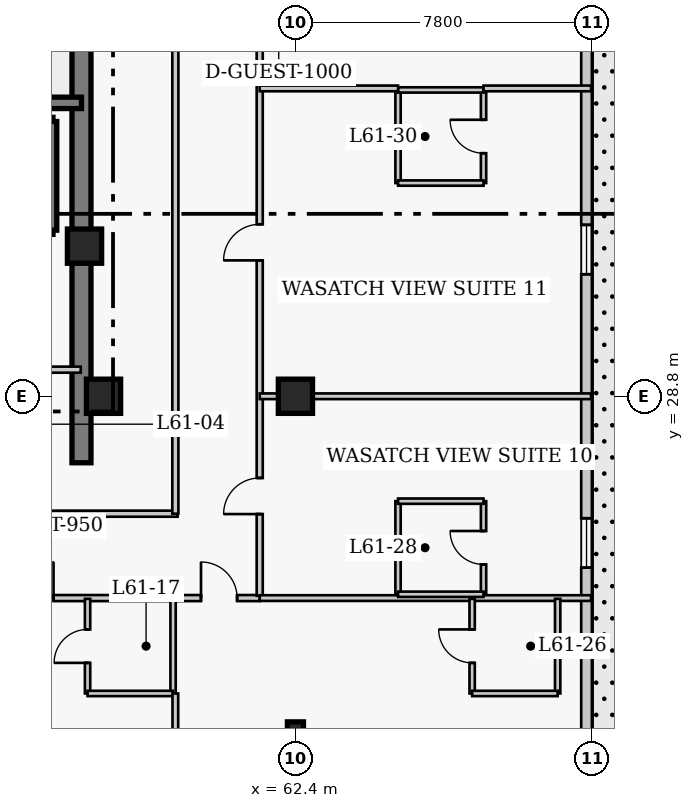
"""IFC4 building model, lengths in metres.
Left out: names, types, materials, properties, quantities, classifications, styles, units other than length and angle.
Written with IfcOpenShell. Run it as: python <this file> out.ifc"""

import sys

from ifc_helpers import new_model, si_unit, direction, frame, frame_2d, origin, origin_2d, place, context, subcontext, project, spatial, rectangle, i_section, extrude, element, fill, save


model = new_model("IFC4")
c1 = context("Model", 3, precision=1e-05, world=origin(), true_north=direction((0.0, 1.0)))
c2 = subcontext(c1, "Body", "Model", "MODEL_VIEW")
j1 = project(units=[si_unit("LENGTHUNIT", "METRE"), si_unit("PLANEANGLEUNIT", "RADIAN")], contexts=[c1])
p1 = place(None, origin())
s1 = spatial("IfcSite", under=j1, at=p1, CompositionType="ELEMENT")
p2 = place(p1, origin())
s2 = spatial("IfcBuilding", under=s1, at=p2, CompositionType="ELEMENT")
p3 = place(p2, frame((0.0, 0.0, 245.4)))
s3 = spatial("IfcBuildingStorey", under=s2, at=p3, CompositionType="ELEMENT", Elevation=245.4)
p4 = place(p3, frame((56.77, 27.05, 0.0), z_axis=(0.0, 0.0, 1.0), x_axis=(0.0, 1.0, 0.0)))
e1 = element("IfcWall", 1, at=p4, inside=s3, PredefinedType="SHEAR", context=c2, shape_type="SweptSolid", body=[
    extrude(rectangle(XDim=13.52, YDim=0.5, at=frame_2d((6.76, 0.0))), origin(), (0.0, 0.0, 1.0), 4.0),
])
p5 = place(p3, frame((48.45, 36.52, 0.0), z_axis=(0.0, 0.0, 1.0), x_axis=(1.0, 0.0, 0.0)))
e2 = element("IfcWall", 2, at=p5, inside=s3, PredefinedType="SHEAR", context=c2, shape_type="SweptSolid", body=[
    extrude(rectangle(XDim=8.32, YDim=0.3, at=frame_2d((4.16, 0.0))), origin(), (0.0, 0.0, 1.0), 4.0),
])
p6 = place(p3, frame((62.4, 20.0, 0.0), z_axis=(0.0, 0.0, 1.0), x_axis=(1.0, 0.0, 0.0)))
e3 = element("IfcColumn", 3, at=p6, inside=s3, PredefinedType="COLUMN", context=c2, shape_type="SweptSolid", body=[
    extrude(i_section(OverallWidth=0.422, OverallDepth=0.465, WebThickness=0.045, FlangeThickness=0.073, FilletRadius=0.017, at=origin_2d()), origin(), (0.0, 0.0, 1.0), 4.0),
])
for number, where, z_axis, x_axis in (
    (4, (62.4, 28.8, 0.0), (0.0, 0.0, 1.0), (1.0, 0.0, 0.0)),
    (5, (57.35, 28.8, 0.0), (0.0, 0.0, 1.0), (1.0, 0.0, 0.0)),
    (6, (56.85, 32.75, 0.0), (0.0, 0.0, 1.0), (1.0, 0.0, 0.0)),
):
    element("IfcColumn", number, at=place(p3, frame(where, z_axis=z_axis, x_axis=x_axis)), inside=s3, PredefinedType="COLUMN", context=c2, shape_type="SweptSolid", body=[
        extrude(rectangle(XDim=0.9, YDim=0.9, at=origin_2d()), origin(), (0.0, 0.0, 1.0), 4.0),
    ])
p7 = place(p3, frame((70.06, 13.36, 0.0), z_axis=(0.0, 0.0, 1.0), x_axis=(0.0, 1.0, 0.0)))
e7 = element("IfcWall", 7, at=p7, inside=s3, PredefinedType="SOLIDWALL", context=c2, shape_type="SweptSolid", body=[
    extrude(rectangle(XDim=30.88, YDim=0.28, at=frame_2d((15.44, 0.0))), origin(), (0.0, 0.0, 1.0), 3.76),
])
p8 = place(p7, frame((3.21, 0.0, 0.85)))
e8 = element("IfcOpeningElement", 8, at=p8, cuts=e7, PredefinedType="OPENING", context=c2, shape_type="SweptSolid", body=[
    extrude(rectangle(XDim=1.3, YDim=1.7, at=frame_2d((0.65, 0.85))), frame((0.0, 0.15, 0.0), z_axis=(0.0, -1.0, 0.0), x_axis=(1.0, 0.0, 0.0)), (0.0, 0.0, 1.0), 0.3),
])
p9 = place(p7, frame((10.93, 0.0, 0.85)))
e9 = element("IfcOpeningElement", 9, at=p9, cuts=e7, PredefinedType="OPENING", context=c2, shape_type="SweptSolid", body=[
    extrude(rectangle(XDim=1.3, YDim=1.7, at=frame_2d((0.65, 0.85))), frame((0.0, 0.15, 0.0), z_axis=(0.0, -1.0, 0.0), x_axis=(1.0, 0.0, 0.0)), (0.0, 0.0, 1.0), 0.3),
])
p10 = place(p7, frame((18.65, 0.0, 0.85)))
e10 = element("IfcOpeningElement", 10, at=p10, cuts=e7, PredefinedType="OPENING", context=c2, shape_type="SweptSolid", body=[
    extrude(rectangle(XDim=1.3, YDim=1.7, at=frame_2d((0.65, 0.85))), frame((0.0, 0.15, 0.0), z_axis=(0.0, -1.0, 0.0), x_axis=(1.0, 0.0, 0.0)), (0.0, 0.0, 1.0), 0.3),
])
p11 = place(p7, frame((26.37, 0.0, 0.85)))
e11 = element("IfcOpeningElement", 11, at=p11, cuts=e7, PredefinedType="OPENING", context=c2, shape_type="SweptSolid", body=[
    extrude(rectangle(XDim=1.3, YDim=1.7, at=frame_2d((0.65, 0.85))), frame((0.0, 0.15, 0.0), z_axis=(0.0, -1.0, 0.0), x_axis=(1.0, 0.0, 0.0)), (0.0, 0.0, 1.0), 0.3),
])
p12 = place(p3, frame((53.6, 36.03, 0.0), z_axis=(0.0, 0.0, 1.0), x_axis=(1.0, 0.0, 0.0)))
e12 = element("IfcWall", 12, at=p12, inside=s3, PredefinedType="SHEAR", context=c2, shape_type="SweptSolid", body=[
    extrude(rectangle(XDim=2.42, YDim=0.22, at=frame_2d((1.21, 0.0))), origin(), (0.0, 0.0, 1.0), 4.0),
])
p13 = place(p3, frame((53.6, 33.17, 0.0), z_axis=(0.0, 0.0, 1.0), x_axis=(1.0, 0.0, 0.0)))
e13 = element("IfcWall", 13, at=p13, inside=s3, PredefinedType="SHEAR", context=c2, shape_type="SweptSolid", body=[
    extrude(rectangle(XDim=2.42, YDim=0.22, at=frame_2d((1.21, 0.0))), origin(), (0.0, 0.0, 1.0), 4.0),
])
p14 = place(p13, frame((0.65, 0.0, 0.0)))
e14 = element("IfcOpeningElement", 14, at=p14, cuts=e13, PredefinedType="OPENING", context=c2, shape_type="SweptSolid", body=[
    extrude(rectangle(XDim=1.3, YDim=2.15, at=frame_2d((0.65, 1.075))), frame((0.0, 0.12, 0.0), z_axis=(0.0, -1.0, 0.0), x_axis=(1.0, 0.0, 0.0)), (0.0, 0.0, 1.0), 0.24),
])
p15 = place(p3, frame((56.02, 33.17, 0.0), z_axis=(0.0, 0.0, 1.0), x_axis=(0.0, 1.0, 0.0)))
e15 = element("IfcWall", 15, at=p15, inside=s3, PredefinedType="SHEAR", context=c2, shape_type="SweptSolid", body=[
    extrude(rectangle(XDim=2.86, YDim=0.2, at=frame_2d((1.43, 0.0))), origin(), (0.0, 0.0, 1.0), 4.0),
])
p16 = place(p3, frame((51.12, 29.5, 0.0), z_axis=(0.0, 0.0, 1.0), x_axis=(1.0, 0.0, 0.0)))
e16 = element("IfcWall", 16, at=p16, inside=s3, PredefinedType="PARTITIONING", context=c2, shape_type="SweptSolid", body=[
    extrude(rectangle(XDim=5.63, YDim=0.16, at=frame_2d((2.815, 0.0))), origin(), (0.0, 0.0, 1.0), 3.76),
])
p17 = place(p3, frame((35.85, 25.71, 0.0), z_axis=(0.0, 0.0, 1.0), x_axis=(1.0, 0.0, 0.0)))
e17 = element("IfcWall", 17, at=p17, inside=s3, PredefinedType="PARTITIONING", context=c2, shape_type="SweptSolid", body=[
    extrude(rectangle(XDim=23.45, YDim=0.16, at=frame_2d((11.725, 0.0))), origin(), (0.0, 0.0, 1.0), 3.76),
])
p18 = place(p17, frame((6.15, 0.0, 0.0)))
e18 = element("IfcOpeningElement", 18, at=p18, cuts=e17, PredefinedType="OPENING", context=c2, shape_type="SweptSolid", body=[
    extrude(rectangle(XDim=1.0, YDim=2.15, at=frame_2d((0.5, 1.075))), frame((0.0, 0.09, 0.0), z_axis=(0.0, -1.0, 0.0), x_axis=(1.0, 0.0, 0.0)), (0.0, 0.0, 1.0), 0.18),
])
p19 = place(p17, frame((13.65, 0.0, 0.0)))
e19 = element("IfcOpeningElement", 19, at=p19, cuts=e17, PredefinedType="OPENING", context=c2, shape_type="SweptSolid", body=[
    extrude(rectangle(XDim=1.0, YDim=2.15, at=frame_2d((0.5, 1.075))), frame((0.0, 0.09, 0.0), z_axis=(0.0, -1.0, 0.0), x_axis=(1.0, 0.0, 0.0)), (0.0, 0.0, 1.0), 0.18),
])
p20 = place(p3, frame((35.8, 23.49, 0.0), z_axis=(0.0, 0.0, 1.0), x_axis=(1.0, 0.0, 0.0)))
e20 = element("IfcWall", 20, at=p20, inside=s3, PredefinedType="PARTITIONING", context=c2, shape_type="SweptSolid", body=[
    extrude(rectangle(XDim=25.66, YDim=0.16, at=frame_2d((12.83, 0.0))), origin(), (0.0, 0.0, 1.0), 3.76),
])
p21 = place(p20, frame((1.555, 0.0, 0.0)))
e21 = element("IfcOpeningElement", 21, at=p21, cuts=e20, PredefinedType="OPENING", context=c2, shape_type="SweptSolid", body=[
    extrude(rectangle(XDim=0.95, YDim=2.1, at=frame_2d((0.475, 1.05))), frame((0.0, 0.09, 0.0), z_axis=(0.0, -1.0, 0.0), x_axis=(1.0, 0.0, 0.0)), (0.0, 0.0, 1.0), 0.18),
])
p22 = place(p20, frame((10.57, 0.0, 0.0)))
e22 = element("IfcOpeningElement", 22, at=p22, cuts=e20, PredefinedType="OPENING", context=c2, shape_type="SweptSolid", body=[
    extrude(rectangle(XDim=0.95, YDim=2.1, at=frame_2d((0.475, 1.05))), frame((0.0, 0.09, 0.0), z_axis=(0.0, -1.0, 0.0), x_axis=(1.0, 0.0, 0.0)), (0.0, 0.0, 1.0), 0.18),
])
p23 = place(p20, frame((15.105, 0.0, 0.0)))
e23 = element("IfcOpeningElement", 23, at=p23, cuts=e20, PredefinedType="OPENING", context=c2, shape_type="SweptSolid", body=[
    extrude(rectangle(XDim=1.0, YDim=2.15, at=frame_2d((0.5, 1.075))), frame((0.0, 0.09, 0.0), z_axis=(0.0, -1.0, 0.0), x_axis=(1.0, 0.0, 0.0)), (0.0, 0.0, 1.0), 0.18),
])
p24 = place(p20, frame((19.285, 0.0, 0.0)))
e24 = element("IfcOpeningElement", 24, at=p24, cuts=e20, PredefinedType="OPENING", context=c2, shape_type="SweptSolid", body=[
    extrude(rectangle(XDim=0.95, YDim=2.1, at=frame_2d((0.475, 1.05))), frame((0.0, 0.09, 0.0), z_axis=(0.0, -1.0, 0.0), x_axis=(1.0, 0.0, 0.0)), (0.0, 0.0, 1.0), 0.18),
])
p25 = place(p20, frame((24.115, 0.0, 0.0)))
e25 = element("IfcOpeningElement", 25, at=p25, cuts=e20, PredefinedType="OPENING", context=c2, shape_type="SweptSolid", body=[
    extrude(rectangle(XDim=0.95, YDim=2.1, at=frame_2d((0.475, 1.05))), frame((0.0, 0.09, 0.0), z_axis=(0.0, -1.0, 0.0), x_axis=(1.0, 0.0, 0.0)), (0.0, 0.0, 1.0), 0.18),
])
p26 = place(p3, frame((61.46, 23.55, 0.0), z_axis=(0.0, 0.0, 1.0), x_axis=(0.0, 1.0, 0.0)))
e26 = element("IfcWall", 26, at=p26, inside=s3, PredefinedType="PARTITIONING", context=c2, shape_type="SweptSolid", body=[
    extrude(rectangle(XDim=17.1, YDim=0.16, at=frame_2d((8.55, 0.0))), origin(), (0.0, 0.0, 1.0), 3.76),
])
p27 = place(p26, frame((2.15, 0.0, 0.0)))
e27 = element("IfcOpeningElement", 27, at=p27, cuts=e26, PredefinedType="OPENING", context=c2, shape_type="SweptSolid", body=[
    extrude(rectangle(XDim=0.95, YDim=2.1, at=frame_2d((0.475, 1.05))), frame((0.0, 0.09, 0.0), z_axis=(0.0, -1.0, 0.0), x_axis=(1.0, 0.0, 0.0)), (0.0, 0.0, 1.0), 0.18),
])
p28 = place(p26, frame((8.825, 0.0, 0.0)))
e28 = element("IfcOpeningElement", 28, at=p28, cuts=e26, PredefinedType="OPENING", context=c2, shape_type="SweptSolid", body=[
    extrude(rectangle(XDim=0.95, YDim=2.1, at=frame_2d((0.475, 1.05))), frame((0.0, 0.09, 0.0), z_axis=(0.0, -1.0, 0.0), x_axis=(1.0, 0.0, 0.0)), (0.0, 0.0, 1.0), 0.18),
])
p29 = place(p26, frame((15.66, 0.0, 0.0)))
e29 = element("IfcOpeningElement", 29, at=p29, cuts=e26, PredefinedType="OPENING", context=c2, shape_type="SweptSolid", body=[
    extrude(rectangle(XDim=1.0, YDim=2.15, at=frame_2d((0.5, 1.075))), frame((0.0, 0.09, 0.0), z_axis=(0.0, -1.0, 0.0), x_axis=(1.0, 0.0, 0.0)), (0.0, 0.0, 1.0), 0.18),
])
p30 = place(p3, frame((59.24, 25.71, 0.0), z_axis=(0.0, 0.0, 1.0), x_axis=(0.0, 1.0, 0.0)))
e30 = element("IfcWall", 30, at=p30, inside=s3, PredefinedType="PARTITIONING", context=c2, shape_type="SweptSolid", body=[
    extrude(rectangle(XDim=14.94, YDim=0.16, at=frame_2d((7.47, 0.0))), origin(), (0.0, 0.0, 1.0), 3.76),
])
p31 = place(p3, frame((56.93, 20.98, 0.0), z_axis=(0.0, 0.0, 1.0), x_axis=(0.0, 1.0, 0.0)))
e31 = element("IfcWall", 31, at=p31, inside=s3, PredefinedType="PLUMBINGWALL", context=c2, shape_type="SweptSolid", body=[
    extrude(rectangle(XDim=2.49, YDim=0.14, at=frame_2d((1.245, 0.0))), origin(), (0.0, 0.0, 1.0), 3.76),
])
p32 = place(p31, frame((0.805, 0.0, 0.0)))
e32 = element("IfcOpeningElement", 32, at=p32, cuts=e31, PredefinedType="OPENING", context=c2, shape_type="SweptSolid", body=[
    extrude(rectangle(XDim=0.88, YDim=2.05, at=frame_2d((0.44, 1.025))), frame((0.0, 0.08, 0.0), z_axis=(0.0, -1.0, 0.0), x_axis=(1.0, 0.0, 0.0)), (0.0, 0.0, 1.0), 0.16),
])
p33 = place(p3, frame((59.18, 20.98, 0.0), z_axis=(0.0, 0.0, 1.0), x_axis=(0.0, 1.0, 0.0)))
e33 = element("IfcWall", 33, at=p33, inside=s3, PredefinedType="PLUMBINGWALL", context=c2, shape_type="SweptSolid", body=[
    extrude(rectangle(XDim=2.49, YDim=0.14, at=frame_2d((1.245, 0.0))), origin(), (0.0, 0.0, 1.0), 3.76),
])
p34 = place(p3, frame((56.93, 20.98, 0.0), z_axis=(0.0, 0.0, 1.0), x_axis=(1.0, 0.0, 0.0)))
e34 = element("IfcWall", 34, at=p34, inside=s3, PredefinedType="PLUMBINGWALL", context=c2, shape_type="SweptSolid", body=[
    extrude(rectangle(XDim=2.25, YDim=0.14, at=frame_2d((1.125, 0.0))), origin(), (0.0, 0.0, 1.0), 3.76),
])
p35 = place(p3, frame((59.24, 9.72, 0.0), z_axis=(0.0, 0.0, 1.0), x_axis=(0.0, 1.0, 0.0)))
e35 = element("IfcWall", 35, at=p35, inside=s3, PredefinedType="PARTITIONING", context=c2, shape_type="SweptSolid", body=[
    extrude(rectangle(XDim=11.26, YDim=0.15, at=frame_2d((5.63, 0.0))), origin(), (0.0, 0.0, 1.0), 3.76),
])
p36 = place(p3, frame((61.46, 23.49, 0.0), z_axis=(0.0, 0.0, 1.0), x_axis=(1.0, 0.0, 0.0)))
e36 = element("IfcWall", 36, at=p36, inside=s3, PredefinedType="PARTITIONING", context=c2, shape_type="SweptSolid", body=[
    extrude(rectangle(XDim=8.72, YDim=0.15, at=frame_2d((4.36, 0.0))), origin(), (0.0, 0.0, 1.0), 3.76),
])
p37 = place(p3, frame((67.05, 20.98, 0.0), z_axis=(0.0, 0.0, 1.0), x_axis=(0.0, 1.0, 0.0)))
e37 = element("IfcWall", 37, at=p37, inside=s3, PredefinedType="PLUMBINGWALL", context=c2, shape_type="SweptSolid", body=[
    extrude(rectangle(XDim=2.49, YDim=0.14, at=frame_2d((1.245, 0.0))), origin(), (0.0, 0.0, 1.0), 3.76),
])
p38 = place(p37, frame((0.805, 0.0, 0.0)))
e38 = element("IfcOpeningElement", 38, at=p38, cuts=e37, PredefinedType="OPENING", context=c2, shape_type="SweptSolid", body=[
    extrude(rectangle(XDim=0.88, YDim=2.05, at=frame_2d((0.44, 1.025))), frame((0.0, 0.08, 0.0), z_axis=(0.0, -1.0, 0.0), x_axis=(1.0, 0.0, 0.0)), (0.0, 0.0, 1.0), 0.16),
])
p39 = place(p3, frame((69.3, 20.98, 0.0), z_axis=(0.0, 0.0, 1.0), x_axis=(0.0, 1.0, 0.0)))
e39 = element("IfcWall", 39, at=p39, inside=s3, PredefinedType="PLUMBINGWALL", context=c2, shape_type="SweptSolid", body=[
    extrude(rectangle(XDim=2.49, YDim=0.14, at=frame_2d((1.245, 0.0))), origin(), (0.0, 0.0, 1.0), 3.76),
])
p40 = place(p3, frame((67.05, 20.98, 0.0), z_axis=(0.0, 0.0, 1.0), x_axis=(1.0, 0.0, 0.0)))
e40 = element("IfcWall", 40, at=p40, inside=s3, PredefinedType="PLUMBINGWALL", context=c2, shape_type="SweptSolid", body=[
    extrude(rectangle(XDim=2.25, YDim=0.14, at=frame_2d((1.125, 0.0))), origin(), (0.0, 0.0, 1.0), 3.76),
])
p41 = place(p3, frame((65.1, 23.59, 0.0), z_axis=(0.0, 0.0, 1.0), x_axis=(0.0, 1.0, 0.0)))
e41 = element("IfcWall", 41, at=p41, inside=s3, PredefinedType="PLUMBINGWALL", context=c2, shape_type="SweptSolid", body=[
    extrude(rectangle(XDim=2.45, YDim=0.14, at=frame_2d((1.225, 0.0))), origin(), (0.0, 0.0, 1.0), 3.76),
])
p42 = place(p3, frame((67.35, 23.59, 0.0), z_axis=(0.0, 0.0, 1.0), x_axis=(0.0, 1.0, 0.0)))
e42 = element("IfcWall", 42, at=p42, inside=s3, PredefinedType="PLUMBINGWALL", context=c2, shape_type="SweptSolid", body=[
    extrude(rectangle(XDim=2.45, YDim=0.14, at=frame_2d((1.225, 0.0))), origin(), (0.0, 0.0, 1.0), 3.76),
])
p43 = place(p42, frame((0.785, 0.0, 0.0)))
e43 = element("IfcOpeningElement", 43, at=p43, cuts=e42, PredefinedType="OPENING", context=c2, shape_type="SweptSolid", body=[
    extrude(rectangle(XDim=0.88, YDim=2.05, at=frame_2d((0.44, 1.025))), frame((0.0, 0.08, 0.0), z_axis=(0.0, -1.0, 0.0), x_axis=(1.0, 0.0, 0.0)), (0.0, 0.0, 1.0), 0.16),
])
for number, where, z_axis, x_axis in (
    (44, (65.1, 23.59, 0.0), (0.0, 0.0, 1.0), (1.0, 0.0, 0.0)),
    (45, (65.1, 26.04, 0.0), (0.0, 0.0, 1.0), (1.0, 0.0, 0.0)),
):
    element("IfcWall", number, at=place(p3, frame(where, z_axis=z_axis, x_axis=x_axis)), inside=s3, PredefinedType="PLUMBINGWALL", context=c2, shape_type="SweptSolid", body=[
        extrude(rectangle(XDim=2.25, YDim=0.14, at=frame_2d((1.125, 0.0))), origin(), (0.0, 0.0, 1.0), 3.76),
    ])
p44 = place(p3, frame((61.46, 28.8, 0.0), z_axis=(0.0, 0.0, 1.0), x_axis=(1.0, 0.0, 0.0)))
e46 = element("IfcWall", 46, at=p44, inside=s3, PredefinedType="PARTITIONING", context=c2, shape_type="SweptSolid", body=[
    extrude(rectangle(XDim=8.72, YDim=0.15, at=frame_2d((4.36, 0.0))), origin(), (0.0, 0.0, 1.0), 3.064),
])
p45 = place(p3, frame((65.1, 34.41, 0.0), z_axis=(0.0, 0.0, 1.0), x_axis=(0.0, 1.0, 0.0)))
e47 = element("IfcWall", 47, at=p45, inside=s3, PredefinedType="PLUMBINGWALL", context=c2, shape_type="SweptSolid", body=[
    extrude(rectangle(XDim=2.45, YDim=0.14, at=frame_2d((1.225, 0.0))), origin(), (0.0, 0.0, 1.0), 3.76),
])
p46 = place(p3, frame((67.35, 34.41, 0.0), z_axis=(0.0, 0.0, 1.0), x_axis=(0.0, 1.0, 0.0)))
e48 = element("IfcWall", 48, at=p46, inside=s3, PredefinedType="PLUMBINGWALL", context=c2, shape_type="SweptSolid", body=[
    extrude(rectangle(XDim=2.45, YDim=0.14, at=frame_2d((1.225, 0.0))), origin(), (0.0, 0.0, 1.0), 3.76),
])
p47 = place(p46, frame((0.785, 0.0, 0.0)))
e49 = element("IfcOpeningElement", 49, at=p47, cuts=e48, PredefinedType="OPENING", context=c2, shape_type="SweptSolid", body=[
    extrude(rectangle(XDim=0.88, YDim=2.05, at=frame_2d((0.44, 1.025))), frame((0.0, 0.08, 0.0), z_axis=(0.0, -1.0, 0.0), x_axis=(1.0, 0.0, 0.0)), (0.0, 0.0, 1.0), 0.16),
])
for number, where, z_axis, x_axis in (
    (50, (65.1, 34.41, 0.0), (0.0, 0.0, 1.0), (1.0, 0.0, 0.0)),
    (51, (65.1, 36.86, 0.0), (0.0, 0.0, 1.0), (1.0, 0.0, 0.0)),
):
    element("IfcWall", number, at=place(p3, frame(where, z_axis=z_axis, x_axis=x_axis)), inside=s3, PredefinedType="PLUMBINGWALL", context=c2, shape_type="SweptSolid", body=[
        extrude(rectangle(XDim=2.25, YDim=0.14, at=frame_2d((1.125, 0.0))), origin(), (0.0, 0.0, 1.0), 3.76),
    ])
p48 = place(p3, frame((61.46, 36.9, 0.0), z_axis=(0.0, 0.0, 1.0), x_axis=(1.0, 0.0, 0.0)))
e52 = element("IfcWall", 52, at=p48, inside=s3, PredefinedType="PARTITIONING", context=c2, shape_type="SweptSolid", body=[
    extrude(rectangle(XDim=3.64, YDim=0.15, at=frame_2d((1.82, 0.0))), origin(), (0.0, 0.0, 1.0), 3.76),
])
p49 = place(p3, frame((67.35, 36.9, 0.0), z_axis=(0.0, 0.0, 1.0), x_axis=(1.0, 0.0, 0.0)))
e53 = element("IfcWall", 53, at=p49, inside=s3, PredefinedType="PARTITIONING", context=c2, shape_type="SweptSolid", body=[
    extrude(rectangle(XDim=2.83, YDim=0.15, at=frame_2d((1.415, 0.0))), origin(), (0.0, 0.0, 1.0), 3.76),
])
p50 = place(p9, origin())
e54 = element("IfcWindow", 54, at=p50, inside=s3, PartitioningType="SINGLE_PANEL", PredefinedType="WINDOW", context=c2, shape_type="SweptSolid", body=[
    extrude(rectangle(XDim=1.3, YDim=1.7, at=frame_2d((0.65, 0.85))), frame((0.0, 0.03, 0.0), z_axis=(0.0, -1.0, 0.0), x_axis=(1.0, 0.0, 0.0)), (0.0, 0.0, 1.0), 0.06),
])
fill(e9, e54)
p51 = place(p10, origin())
e55 = element("IfcWindow", 55, at=p51, inside=s3, PartitioningType="SINGLE_PANEL", PredefinedType="WINDOW", context=c2, shape_type="SweptSolid", body=[
    extrude(rectangle(XDim=1.3, YDim=1.7, at=frame_2d((0.65, 0.85))), frame((0.0, 0.03, 0.0), z_axis=(0.0, -1.0, 0.0), x_axis=(1.0, 0.0, 0.0)), (0.0, 0.0, 1.0), 0.06),
])
fill(e10, e55)
p52 = place(p32, origin())
e56 = element("IfcDoor", 56, at=p52, inside=s3, OperationType="SINGLE_SWING_LEFT", PredefinedType="DOOR", context=c2, shape_type="SweptSolid", body=[
    extrude(rectangle(XDim=0.88, YDim=2.05, at=frame_2d((0.44, 1.025))), frame((0.0, 0.025, 0.0), z_axis=(0.0, -1.0, 0.0), x_axis=(1.0, 0.0, 0.0)), (0.0, 0.0, 1.0), 0.05),
])
fill(e32, e56)
p53 = place(p24, origin())
e57 = element("IfcDoor", 57, at=p53, inside=s3, OperationType="SINGLE_SWING_RIGHT", PredefinedType="DOOR", context=c2, shape_type="SweptSolid", body=[
    extrude(rectangle(XDim=0.95, YDim=2.1, at=frame_2d((0.475, 1.05))), frame((0.0, 0.025, 0.0), z_axis=(0.0, -1.0, 0.0), x_axis=(1.0, 0.0, 0.0)), (0.0, 0.0, 1.0), 0.05),
])
fill(e24, e57)
p54 = place(p38, origin())
e58 = element("IfcDoor", 58, at=p54, inside=s3, OperationType="SINGLE_SWING_RIGHT", PredefinedType="DOOR", context=c2, shape_type="SweptSolid", body=[
    extrude(rectangle(XDim=0.88, YDim=2.05, at=frame_2d((0.44, 1.025))), frame((0.0, 0.025, 0.0), z_axis=(0.0, -1.0, 0.0), x_axis=(1.0, 0.0, 0.0)), (0.0, 0.0, 1.0), 0.05),
])
fill(e38, e58)
p55 = place(p25, origin())
e59 = element("IfcDoor", 59, at=p55, inside=s3, OperationType="SINGLE_SWING_LEFT", PredefinedType="DOOR", context=c2, shape_type="SweptSolid", body=[
    extrude(rectangle(XDim=0.95, YDim=2.1, at=frame_2d((0.475, 1.05))), frame((0.0, 0.025, 0.0), z_axis=(0.0, -1.0, 0.0), x_axis=(1.0, 0.0, 0.0)), (0.0, 0.0, 1.0), 0.05),
])
fill(e25, e59)
p56 = place(p43, origin())
e60 = element("IfcDoor", 60, at=p56, inside=s3, OperationType="SINGLE_SWING_RIGHT", PredefinedType="DOOR", context=c2, shape_type="SweptSolid", body=[
    extrude(rectangle(XDim=0.88, YDim=2.05, at=frame_2d((0.44, 1.025))), frame((0.0, 0.025, 0.0), z_axis=(0.0, -1.0, 0.0), x_axis=(1.0, 0.0, 0.0)), (0.0, 0.0, 1.0), 0.05),
])
fill(e43, e60)
p57 = place(p27, origin())
e61 = element("IfcDoor", 61, at=p57, inside=s3, OperationType="SINGLE_SWING_LEFT", PredefinedType="DOOR", context=c2, shape_type="SweptSolid", body=[
    extrude(rectangle(XDim=0.95, YDim=2.1, at=frame_2d((0.475, 1.05))), frame((0.0, 0.025, 0.0), z_axis=(0.0, -1.0, 0.0), x_axis=(1.0, 0.0, 0.0)), (0.0, 0.0, 1.0), 0.05),
])
fill(e27, e61)
p58 = place(p47, origin())
e62 = element("IfcDoor", 62, at=p58, inside=s3, OperationType="SINGLE_SWING_RIGHT", PredefinedType="DOOR", context=c2, shape_type="SweptSolid", body=[
    extrude(rectangle(XDim=0.88, YDim=2.05, at=frame_2d((0.44, 1.025))), frame((0.0, 0.025, 0.0), z_axis=(0.0, -1.0, 0.0), x_axis=(1.0, 0.0, 0.0)), (0.0, 0.0, 1.0), 0.05),
])
fill(e49, e62)
p59 = place(p28, origin())
e63 = element("IfcDoor", 63, at=p59, inside=s3, OperationType="SINGLE_SWING_LEFT", PredefinedType="DOOR", context=c2, shape_type="SweptSolid", body=[
    extrude(rectangle(XDim=0.95, YDim=2.1, at=frame_2d((0.475, 1.05))), frame((0.0, 0.025, 0.0), z_axis=(0.0, -1.0, 0.0), x_axis=(1.0, 0.0, 0.0)), (0.0, 0.0, 1.0), 0.05),
])
fill(e28, e63)
save(model, sys.argv[1])
